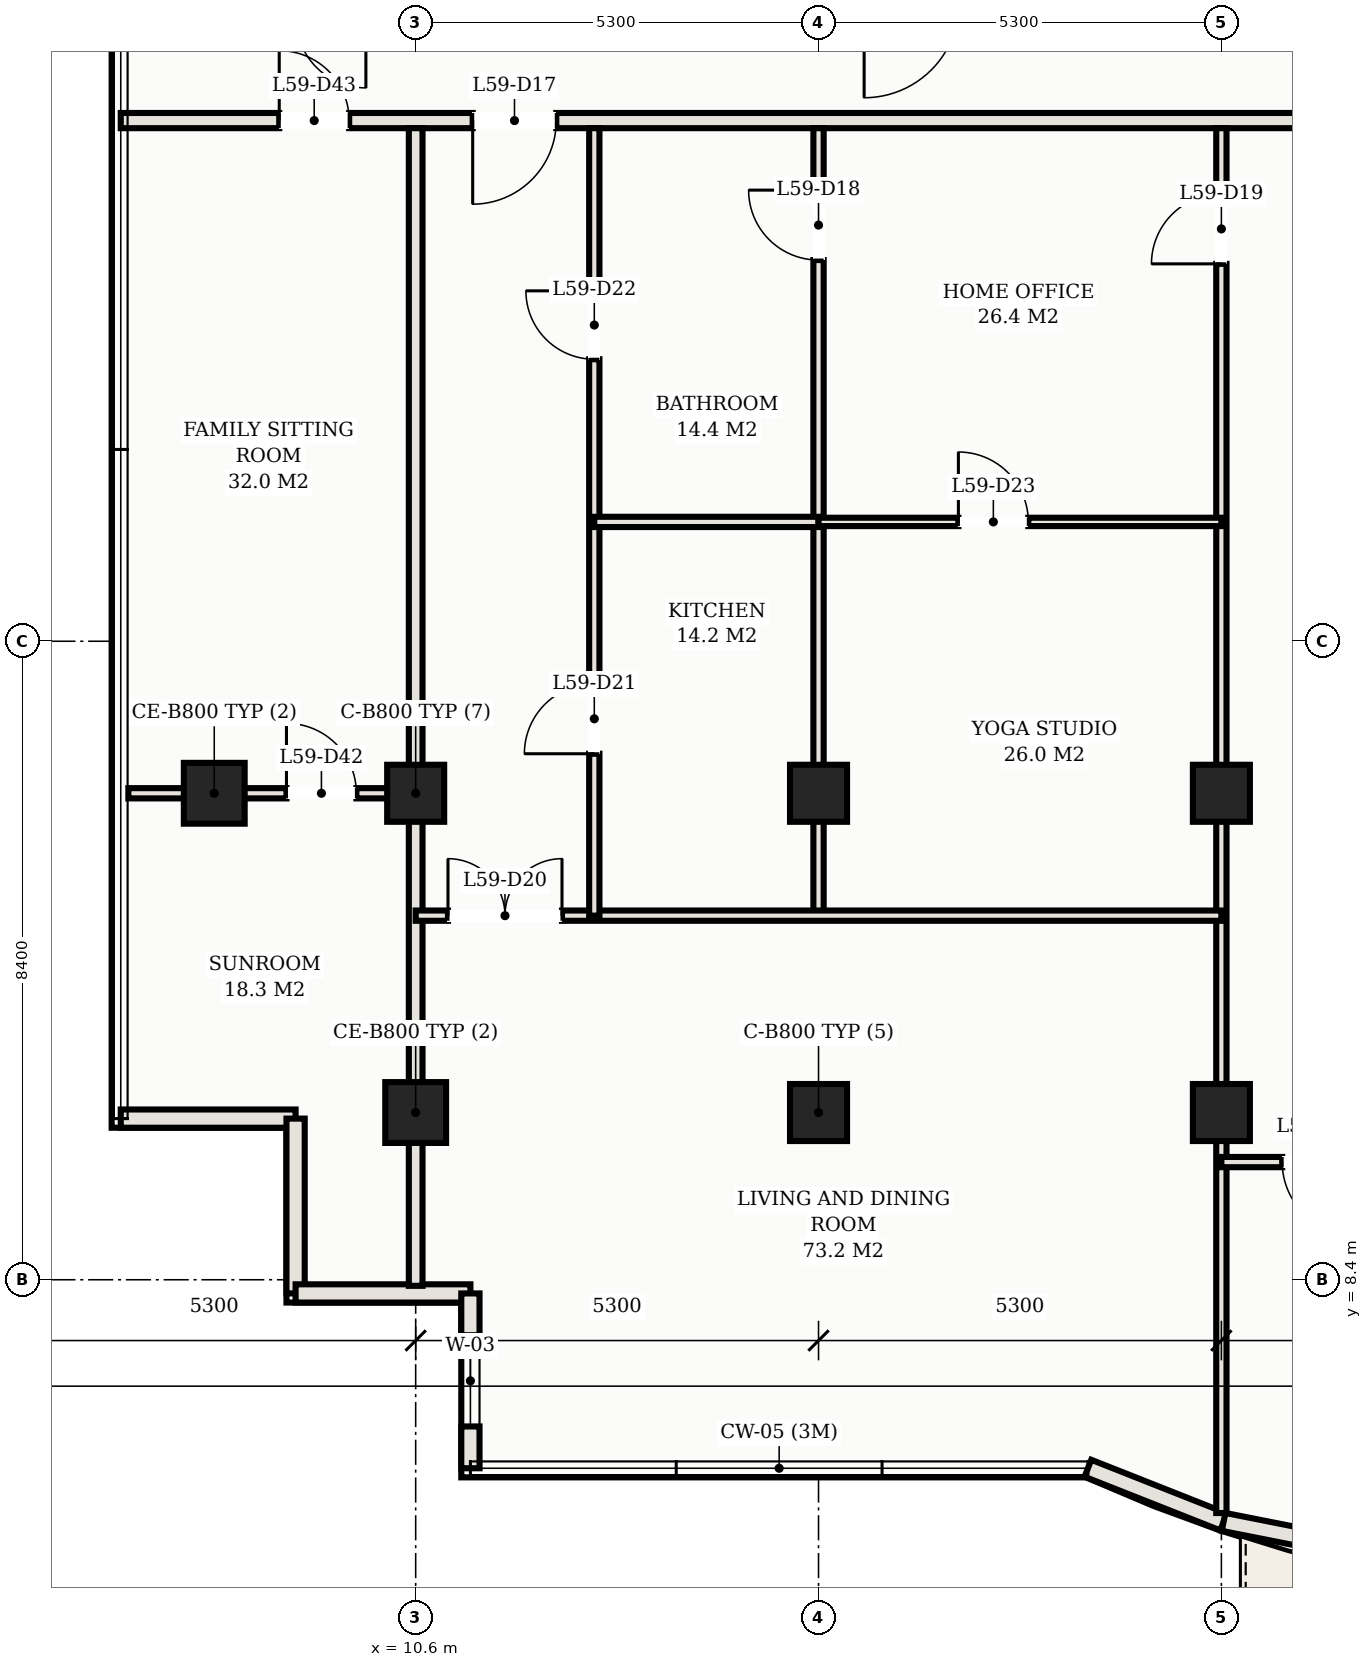
"""IFC4 building model, lengths in metres.
Left out: names, types, materials, properties, quantities, classifications, styles, units other than length and angle.
Written with IfcOpenShell. Run it as: python <this file> out.ifc"""

import sys

from ifc_helpers import new_model, si_unit, direction, frame, frame_2d, origin, origin_2d, place, context, subcontext, project, spatial, rectangle, hollow_rectangle, extrude, element, fill, save


model = new_model("IFC4")
c1 = context("Model", 3, precision=1e-05, world=origin(), true_north=direction((0.0, 1.0)))
c2 = subcontext(c1, "Body", "Model", "MODEL_VIEW")
j1 = project(units=[si_unit("LENGTHUNIT", "METRE"), si_unit("PLANEANGLEUNIT", "RADIAN")], contexts=[c1])
p1 = place(None, origin())
s1 = spatial("IfcSite", under=j1, at=p1, CompositionType="ELEMENT")
p2 = place(p1, origin())
s2 = spatial("IfcBuilding", under=s1, at=p2, CompositionType="ELEMENT")
p3 = place(p2, frame((0.0, 0.0, 216.5)))
s3 = spatial("IfcBuildingStorey", under=s2, at=p3, CompositionType="ELEMENT", Elevation=216.5)
p4 = place(p3, frame((10.6, 14.8, 0.0), z_axis=(0.0, 0.0, 1.0), x_axis=(1.0, 0.0, 0.0)))
e1 = element("IfcColumn", 1, at=p4, inside=s3, PredefinedType="COLUMN", context=c2, shape_type="SweptSolid", body=[
    extrude(hollow_rectangle(XDim=0.75, YDim=0.75, WallThickness=0.025, at=origin_2d()), origin(), (0.0, 0.0, 1.0), 3.3),
])
p5 = place(p3, frame((10.6, 10.6, 0.0), z_axis=(0.0, 0.0, 1.0), x_axis=(1.0, 0.0, 0.0)))
e2 = element("IfcColumn", 2, at=p5, inside=s3, PredefinedType="COLUMN", context=c2, shape_type="SweptSolid", body=[
    extrude(hollow_rectangle(XDim=0.8, YDim=0.8, WallThickness=0.028, at=origin_2d()), origin(), (0.0, 0.0, 1.0), 3.3),
])
for number, where, z_axis, x_axis in (
    (3, (15.9, 14.8, 0.0), (0.0, 0.0, 1.0), (1.0, 0.0, 0.0)),
    (4, (15.9, 10.6, 0.0), (0.0, 0.0, 1.0), (1.0, 0.0, 0.0)),
    (5, (21.2, 14.8, 0.0), (0.0, 0.0, 1.0), (1.0, 0.0, 0.0)),
    (6, (21.2, 10.6, 0.0), (0.0, 0.0, 1.0), (1.0, 0.0, 0.0)),
):
    element("IfcColumn", number, at=place(p3, frame(where, z_axis=z_axis, x_axis=x_axis)), inside=s3, PredefinedType="COLUMN", context=c2, shape_type="SweptSolid", body=[
        extrude(hollow_rectangle(XDim=0.75, YDim=0.75, WallThickness=0.025, at=origin_2d()), origin(), (0.0, 0.0, 1.0), 3.3),
    ])
p6 = place(p3, frame((7.95, 14.8, 0.0), z_axis=(0.0, 0.0, 1.0), x_axis=(1.0, 0.0, 0.0)))
e7 = element("IfcColumn", 7, at=p6, inside=s3, PredefinedType="COLUMN", context=c2, shape_type="SweptSolid", body=[
    extrude(hollow_rectangle(XDim=0.8, YDim=0.8, WallThickness=0.028, at=origin_2d()), origin(), (0.0, 0.0, 1.0), 3.3),
])
for number, where, z_axis, x_axis in (
    (8, (6.72, 10.52, 0.0), (0.0, 0.0, 1.0), (1.0, 0.0, 0.0)),
    (9, (9.02, 10.52, 0.0), (0.0, 0.0, 1.0), (0.0, -1.0, 0.0)),
    (10, (9.02, 8.22, 0.0), (0.0, 0.0, 1.0), (1.0, 0.0, 0.0)),
):
    element("IfcWall", number, at=place(p3, frame(where, z_axis=z_axis, x_axis=x_axis)), inside=s3, PredefinedType="SOLIDWALL", context=c2, shape_type="SweptSolid", body=[
        extrude(rectangle(XDim=2.3, YDim=0.24, at=frame_2d((1.15, 0.0))), origin(), (0.0, 0.0, 1.0), 3.11),
    ])
p7 = place(p3, frame((11.32, 8.22, 0.0), z_axis=(0.0, 0.0, 1.0), x_axis=(0.0, -1.0, 0.0)))
e11 = element("IfcWall", 11, at=p7, inside=s3, PredefinedType="SOLIDWALL", context=c2, shape_type="SweptSolid", body=[
    extrude(rectangle(XDim=2.3, YDim=0.24, at=frame_2d((1.15, 0.0))), origin(), (0.0, 0.0, 1.0), 3.11),
])
p8 = place(p7, frame((0.55, 0.0, 0.75)))
e12 = element("IfcOpeningElement", 12, at=p8, cuts=e11, PredefinedType="OPENING", context=c2, shape_type="SweptSolid", body=[
    extrude(rectangle(XDim=1.2, YDim=1.5, at=frame_2d((0.6, 0.75))), frame((0.0, 0.13, 0.0), z_axis=(0.0, -1.0, 0.0), x_axis=(1.0, 0.0, 0.0)), (0.0, 0.0, 1.0), 0.26),
])
p9 = place(p3, frame((19.444, 5.92, 0.0), z_axis=(0.0, 0.0, 1.0), x_axis=(0.92993442177, -0.367725401906, 0.0)))
e13 = element("IfcWall", 13, at=p9, inside=s3, PredefinedType="SOLIDWALL", context=c2, shape_type="SweptSolid", body=[
    extrude(rectangle(XDim=1.919, YDim=0.24, at=frame_2d((0.96, 0.0))), origin(), (0.0, 0.0, 1.0), 3.11),
])
p10 = place(p3, frame((21.229, 5.214, 0.0), z_axis=(0.0, 0.0, 1.0), x_axis=(0.980985349685, -0.194081796425, 0.0)))
e14 = element("IfcWall", 14, at=p10, inside=s3, PredefinedType="SOLIDWALL", context=c2, shape_type="SweptSolid", body=[
    extrude(rectangle(XDim=4.478, YDim=0.24, at=frame_2d((2.239, 0.0))), origin(), (0.0, 0.0, 1.0), 3.11),
])
p11 = place(p10, frame((1.381, 0.0, 0.0)))
e15 = element("IfcOpeningElement", 15, at=p11, cuts=e14, PredefinedType="OPENING", context=c2, shape_type="SweptSolid", body=[
    extrude(rectangle(XDim=1.8, YDim=2.2, at=frame_2d((0.9, 1.1))), frame((0.0, 0.13, 0.0), z_axis=(0.0, -1.0, 0.0), x_axis=(1.0, 0.0, 0.0)), (0.0, 0.0, 1.0), 0.26),
])
p12 = place(p3, frame((6.72, 23.65, 0.0), z_axis=(0.0, 0.0, 1.0), x_axis=(1.0, 0.0, 0.0)))
e16 = element("IfcWall", 16, at=p12, inside=s3, PredefinedType="PARTITIONING", context=c2, shape_type="SweptSolid", body=[
    extrude(rectangle(XDim=39.56, YDim=0.2, at=frame_2d((19.78, 0.0))), origin(), (0.0, 0.0, 1.0), 2.43),
])
p13 = place(p12, frame((4.63, 0.0, 0.0)))
e17 = element("IfcOpeningElement", 17, at=p13, cuts=e16, PredefinedType="OPENING", context=c2, shape_type="SweptSolid", body=[
    extrude(rectangle(XDim=1.1, YDim=2.25, at=frame_2d((0.55, 1.125))), frame((0.0, 0.11, 0.0), z_axis=(0.0, -1.0, 0.0), x_axis=(1.0, 0.0, 0.0)), (0.0, 0.0, 1.0), 0.22),
])
p14 = place(p12, frame((20.53, 0.0, 0.0)))
e18 = element("IfcOpeningElement", 18, at=p14, cuts=e16, PredefinedType="OPENING", context=c2, shape_type="SweptSolid", body=[
    extrude(rectangle(XDim=1.1, YDim=2.25, at=frame_2d((0.55, 1.125))), frame((0.0, 0.11, 0.0), z_axis=(0.0, -1.0, 0.0), x_axis=(1.0, 0.0, 0.0)), (0.0, 0.0, 1.0), 0.22),
])
p15 = place(p12, frame((2.085, 0.0, 0.0)))
e19 = element("IfcOpeningElement", 19, at=p15, cuts=e16, PredefinedType="OPENING", context=c2, shape_type="SweptSolid", body=[
    extrude(rectangle(XDim=0.92, YDim=2.15, at=frame_2d((0.46, 1.075))), frame((0.0, 0.11, 0.0), z_axis=(0.0, -1.0, 0.0), x_axis=(1.0, 0.0, 0.0)), (0.0, 0.0, 1.0), 0.22),
])
p16 = place(p12, frame((36.555, 0.0, 0.0)))
e20 = element("IfcOpeningElement", 20, at=p16, cuts=e16, PredefinedType="OPENING", context=c2, shape_type="SweptSolid", body=[
    extrude(rectangle(XDim=0.92, YDim=2.15, at=frame_2d((0.46, 1.075))), frame((0.0, 0.11, 0.0), z_axis=(0.0, -1.0, 0.0), x_axis=(1.0, 0.0, 0.0)), (0.0, 0.0, 1.0), 0.22),
])
p17 = place(p3, frame((10.6, 8.32, 0.0), z_axis=(0.0, 0.0, 1.0), x_axis=(0.0, 1.0, 0.0)))
e21 = element("IfcWall", 21, at=p17, inside=s3, PredefinedType="PARTITIONING", context=c2, shape_type="SweptSolid", body=[
    extrude(rectangle(XDim=15.23, YDim=0.18, at=frame_2d((7.615, 0.0))), origin(), (0.0, 0.0, 1.0), 2.43),
])
p18 = place(p3, frame((15.9, 14.8, 0.0), z_axis=(0.0, 0.0, 1.0), x_axis=(0.0, 1.0, 0.0)))
e22 = element("IfcWall", 22, at=p18, inside=s3, PredefinedType="PARTITIONING", context=c2, shape_type="SweptSolid", body=[
    extrude(rectangle(XDim=8.75, YDim=0.135, at=frame_2d((4.375, 0.0))), origin(), (0.0, 0.0, 1.0), 2.43),
])
p19 = place(p18, frame((7.015, 0.0, 0.0)))
e23 = element("IfcOpeningElement", 23, at=p19, cuts=e22, PredefinedType="OPENING", context=c2, shape_type="SweptSolid", body=[
    extrude(rectangle(XDim=0.92, YDim=2.15, at=frame_2d((0.46, 1.075))), frame((0.0, 0.078, 0.0), z_axis=(0.0, -1.0, 0.0), x_axis=(1.0, 0.0, 0.0)), (0.0, 0.0, 1.0), 0.155),
])
p20 = place(p3, frame((21.2, 5.331, 0.0), z_axis=(0.0, 0.0, 1.0), x_axis=(0.0, 1.0, 0.0)))
e24 = element("IfcWall", 24, at=p20, inside=s3, PredefinedType="PARTITIONING", context=c2, shape_type="SweptSolid", body=[
    extrude(rectangle(XDim=18.219, YDim=0.135, at=frame_2d((9.109, 0.0))), origin(), (0.0, 0.0, 1.0), 2.43),
])
p21 = place(p20, frame((16.434, 0.0, 0.0)))
e25 = element("IfcOpeningElement", 25, at=p21, cuts=e24, PredefinedType="OPENING", context=c2, shape_type="SweptSolid", body=[
    extrude(rectangle(XDim=0.92, YDim=2.15, at=frame_2d((0.46, 1.075))), frame((0.0, 0.078, 0.0), z_axis=(0.0, -1.0, 0.0), x_axis=(1.0, 0.0, 0.0)), (0.0, 0.0, 1.0), 0.155),
])
p22 = place(p3, frame((15.9, 13.19, 0.0), z_axis=(0.0, 0.0, 1.0), x_axis=(0.0, 1.0, 0.0)))
e26 = element("IfcWall", 26, at=p22, inside=s3, PredefinedType="PARTITIONING", context=c2, shape_type="SweptSolid", body=[
    extrude(rectangle(XDim=1.61, YDim=0.135, at=frame_2d((0.805, 0.0))), origin(), (0.0, 0.0, 1.0), 2.43),
])
p23 = place(p3, frame((10.6, 13.19, 0.0), z_axis=(0.0, 0.0, 1.0), x_axis=(1.0, 0.0, 0.0)))
e27 = element("IfcWall", 27, at=p23, inside=s3, PredefinedType="PARTITIONING", context=c2, shape_type="SweptSolid", body=[
    extrude(rectangle(XDim=10.6, YDim=0.135, at=frame_2d((5.3, 0.0))), origin(), (0.0, 0.0, 1.0), 2.43),
])
p24 = place(p23, frame((0.425, 0.0, 0.0)))
e28 = element("IfcOpeningElement", 28, at=p24, cuts=e27, PredefinedType="OPENING", context=c2, shape_type="SweptSolid", body=[
    extrude(rectangle(XDim=1.5, YDim=2.25, at=frame_2d((0.75, 1.125))), frame((0.0, 0.078, 0.0), z_axis=(0.0, -1.0, 0.0), x_axis=(1.0, 0.0, 0.0)), (0.0, 0.0, 1.0), 0.155),
])
p25 = place(p3, frame((12.95, 13.19, 0.0), z_axis=(0.0, 0.0, 1.0), x_axis=(0.0, 1.0, 0.0)))
e29 = element("IfcWall", 29, at=p25, inside=s3, PredefinedType="PARTITIONING", context=c2, shape_type="SweptSolid", body=[
    extrude(rectangle(XDim=10.36, YDim=0.135, at=frame_2d((5.18, 0.0))), origin(), (0.0, 0.0, 1.0), 2.43),
])
p26 = place(p25, frame((2.13, 0.0, 0.0)))
e30 = element("IfcOpeningElement", 30, at=p26, cuts=e29, PredefinedType="OPENING", context=c2, shape_type="SweptSolid", body=[
    extrude(rectangle(XDim=0.92, YDim=2.15, at=frame_2d((0.46, 1.075))), frame((0.0, 0.078, 0.0), z_axis=(0.0, -1.0, 0.0), x_axis=(1.0, 0.0, 0.0)), (0.0, 0.0, 1.0), 0.155),
])
p27 = place(p25, frame((7.32, 0.0, 0.0)))
e31 = element("IfcOpeningElement", 31, at=p27, cuts=e29, PredefinedType="OPENING", context=c2, shape_type="SweptSolid", body=[
    extrude(rectangle(XDim=0.9, YDim=2.15, at=frame_2d((0.45, 1.075))), frame((0.0, 0.078, 0.0), z_axis=(0.0, -1.0, 0.0), x_axis=(1.0, 0.0, 0.0)), (0.0, 0.0, 1.0), 0.155),
])
p28 = place(p3, frame((12.95, 18.37, 0.0), z_axis=(0.0, 0.0, 1.0), x_axis=(1.0, 0.0, 0.0)))
e32 = element("IfcWall", 32, at=p28, inside=s3, PredefinedType="PARTITIONING", context=c2, shape_type="SweptSolid", body=[
    extrude(rectangle(XDim=2.95, YDim=0.135, at=frame_2d((1.475, 0.0))), origin(), (0.0, 0.0, 1.0), 2.43),
])
p29 = place(p3, frame((15.9, 18.37, 0.0), z_axis=(0.0, 0.0, 1.0), x_axis=(1.0, 0.0, 0.0)))
e33 = element("IfcWall", 33, at=p29, inside=s3, PredefinedType="MOVABLE", context=c2, shape_type="SweptSolid", body=[
    extrude(rectangle(XDim=5.3, YDim=0.11, at=frame_2d((2.65, 0.0))), origin(), (0.0, 0.0, 1.0), 2.43),
])
p30 = place(p29, frame((1.84, 0.0, 0.0)))
e34 = element("IfcOpeningElement", 34, at=p30, cuts=e33, PredefinedType="OPENING", context=c2, shape_type="SweptSolid", body=[
    extrude(rectangle(XDim=0.92, YDim=2.15, at=frame_2d((0.46, 1.075))), frame((0.0, 0.065, 0.0), z_axis=(0.0, -1.0, 0.0), x_axis=(1.0, 0.0, 0.0)), (0.0, 0.0, 1.0), 0.13),
])
p31 = place(p3, frame((21.2, 9.948, 0.0), z_axis=(0.0, 0.0, 1.0), x_axis=(1.0, 0.0, 0.0)))
e35 = element("IfcWall", 35, at=p31, inside=s3, PredefinedType="PARTITIONING", context=c2, shape_type="SweptSolid", body=[
    extrude(rectangle(XDim=5.3, YDim=0.135, at=frame_2d((2.65, 0.0))), origin(), (0.0, 0.0, 1.0), 2.43),
])
p32 = place(p31, frame((0.8, 0.0, 0.0)))
e36 = element("IfcOpeningElement", 36, at=p32, cuts=e35, PredefinedType="OPENING", context=c2, shape_type="SweptSolid", body=[
    extrude(rectangle(XDim=0.95, YDim=2.15, at=frame_2d((0.475, 1.075))), frame((0.0, 0.078, 0.0), z_axis=(0.0, -1.0, 0.0), x_axis=(1.0, 0.0, 0.0)), (0.0, 0.0, 1.0), 0.155),
])
p33 = place(p31, frame((2.875, 0.0, 0.0)))
e37 = element("IfcOpeningElement", 37, at=p33, cuts=e35, PredefinedType="OPENING", context=c2, shape_type="SweptSolid", body=[
    extrude(rectangle(XDim=0.9, YDim=2.15, at=frame_2d((0.45, 1.075))), frame((0.0, 0.078, 0.0), z_axis=(0.0, -1.0, 0.0), x_axis=(1.0, 0.0, 0.0)), (0.0, 0.0, 1.0), 0.155),
])
p34 = place(p3, frame((6.82, 14.8, 0.0), z_axis=(0.0, 0.0, 1.0), x_axis=(1.0, 0.0, 0.0)))
e38 = element("IfcWall", 38, at=p34, inside=s3, PredefinedType="PARTITIONING", context=c2, shape_type="SweptSolid", body=[
    extrude(rectangle(XDim=3.78, YDim=0.135, at=frame_2d((1.89, 0.0))), origin(), (0.0, 0.0, 1.0), 2.43),
])
p35 = place(p34, frame((2.08, 0.0, 0.0)))
e39 = element("IfcOpeningElement", 39, at=p35, cuts=e38, PredefinedType="OPENING", context=c2, shape_type="SweptSolid", body=[
    extrude(rectangle(XDim=0.92, YDim=2.15, at=frame_2d((0.46, 1.075))), frame((0.0, 0.078, 0.0), z_axis=(0.0, -1.0, 0.0), x_axis=(1.0, 0.0, 0.0)), (0.0, 0.0, 1.0), 0.155),
])
p36 = place(p8, origin())
e40 = element("IfcWindow", 40, at=p36, inside=s3, PartitioningType="SINGLE_PANEL", PredefinedType="WINDOW", context=c2, shape_type="SweptSolid", body=[
    extrude(rectangle(XDim=1.2, YDim=1.5, at=frame_2d((0.6, 0.75))), frame((0.0, 0.03, 0.0), z_axis=(0.0, -1.0, 0.0), x_axis=(1.0, 0.0, 0.0)), (0.0, 0.0, 1.0), 0.06),
])
fill(e12, e40)
p37 = place(p13, frame((1.1, 0.0, 0.0), z_axis=(0.0, 0.0, 1.0), x_axis=(-1.0, 0.0, 0.0)))
e41 = element("IfcDoor", 41, at=p37, inside=s3, OperationType="SINGLE_SWING_RIGHT", PredefinedType="DOOR", context=c2, shape_type="SweptSolid", body=[
    extrude(rectangle(XDim=1.1, YDim=2.25, at=frame_2d((0.55, 1.125))), frame((0.0, 0.025, 0.0), z_axis=(0.0, -1.0, 0.0), x_axis=(1.0, 0.0, 0.0)), (0.0, 0.0, 1.0), 0.05),
])
fill(e17, e41)
p38 = place(p19, origin())
e42 = element("IfcDoor", 42, at=p38, inside=s3, OperationType="SINGLE_SWING_RIGHT", PredefinedType="DOOR", context=c2, shape_type="SweptSolid", body=[
    extrude(rectangle(XDim=0.92, YDim=2.15, at=frame_2d((0.46, 1.075))), frame((0.0, 0.025, 0.0), z_axis=(0.0, -1.0, 0.0), x_axis=(1.0, 0.0, 0.0)), (0.0, 0.0, 1.0), 0.05),
])
fill(e23, e42)
p39 = place(p21, origin())
e43 = element("IfcDoor", 43, at=p39, inside=s3, OperationType="SINGLE_SWING_LEFT", PredefinedType="DOOR", context=c2, shape_type="SweptSolid", body=[
    extrude(rectangle(XDim=0.92, YDim=2.15, at=frame_2d((0.46, 1.075))), frame((0.0, 0.025, 0.0), z_axis=(0.0, -1.0, 0.0), x_axis=(1.0, 0.0, 0.0)), (0.0, 0.0, 1.0), 0.05),
])
fill(e25, e43)
p40 = place(p24, origin())
e44 = element("IfcDoor", 44, at=p40, inside=s3, OperationType="DOUBLE_DOOR_SINGLE_SWING", PredefinedType="DOOR", context=c2, shape_type="SweptSolid", body=[
    extrude(rectangle(XDim=1.5, YDim=2.25, at=frame_2d((0.75, 1.125))), frame((0.0, 0.025, 0.0), z_axis=(0.0, -1.0, 0.0), x_axis=(1.0, 0.0, 0.0)), (0.0, 0.0, 1.0), 0.05),
])
fill(e28, e44)
p41 = place(p26, origin())
e45 = element("IfcDoor", 45, at=p41, inside=s3, OperationType="SINGLE_SWING_LEFT", PredefinedType="DOOR", context=c2, shape_type="SweptSolid", body=[
    extrude(rectangle(XDim=0.92, YDim=2.15, at=frame_2d((0.46, 1.075))), frame((0.0, 0.025, 0.0), z_axis=(0.0, -1.0, 0.0), x_axis=(1.0, 0.0, 0.0)), (0.0, 0.0, 1.0), 0.05),
])
fill(e30, e45)
p42 = place(p27, origin())
e46 = element("IfcDoor", 46, at=p42, inside=s3, OperationType="SINGLE_SWING_RIGHT", PredefinedType="DOOR", context=c2, shape_type="SweptSolid", body=[
    extrude(rectangle(XDim=0.9, YDim=2.15, at=frame_2d((0.45, 1.075))), frame((0.0, 0.025, 0.0), z_axis=(0.0, -1.0, 0.0), x_axis=(1.0, 0.0, 0.0)), (0.0, 0.0, 1.0), 0.05),
])
fill(e31, e46)
p43 = place(p30, origin())
e47 = element("IfcDoor", 47, at=p43, inside=s3, OperationType="SINGLE_SWING_LEFT", PredefinedType="DOOR", context=c2, shape_type="SweptSolid", body=[
    extrude(rectangle(XDim=0.92, YDim=2.15, at=frame_2d((0.46, 1.075))), frame((0.0, 0.025, 0.0), z_axis=(0.0, -1.0, 0.0), x_axis=(1.0, 0.0, 0.0)), (0.0, 0.0, 1.0), 0.05),
])
fill(e34, e47)
p44 = place(p32, frame((0.95, 0.0, 0.0), z_axis=(0.0, 0.0, 1.0), x_axis=(-1.0, 0.0, 0.0)))
e48 = element("IfcDoor", 48, at=p44, inside=s3, OperationType="SINGLE_SWING_LEFT", PredefinedType="DOOR", context=c2, shape_type="SweptSolid", body=[
    extrude(rectangle(XDim=0.95, YDim=2.15, at=frame_2d((0.475, 1.075))), frame((0.0, 0.025, 0.0), z_axis=(0.0, -1.0, 0.0), x_axis=(1.0, 0.0, 0.0)), (0.0, 0.0, 1.0), 0.05),
])
fill(e36, e48)
p45 = place(p35, origin())
e49 = element("IfcDoor", 49, at=p45, inside=s3, OperationType="SINGLE_SWING_LEFT", PredefinedType="DOOR", context=c2, shape_type="SweptSolid", body=[
    extrude(rectangle(XDim=0.92, YDim=2.15, at=frame_2d((0.46, 1.075))), frame((0.0, 0.025, 0.0), z_axis=(0.0, -1.0, 0.0), x_axis=(1.0, 0.0, 0.0)), (0.0, 0.0, 1.0), 0.05),
])
fill(e39, e49)
p46 = place(p15, origin())
e50 = element("IfcDoor", 50, at=p46, inside=s3, OperationType="SINGLE_SWING_LEFT", PredefinedType="DOOR", context=c2, shape_type="SweptSolid", body=[
    extrude(rectangle(XDim=0.92, YDim=2.15, at=frame_2d((0.46, 1.075))), frame((0.0, 0.025, 0.0), z_axis=(0.0, -1.0, 0.0), x_axis=(1.0, 0.0, 0.0)), (0.0, 0.0, 1.0), 0.05),
])
fill(e19, e50)
save(model, sys.argv[1])
